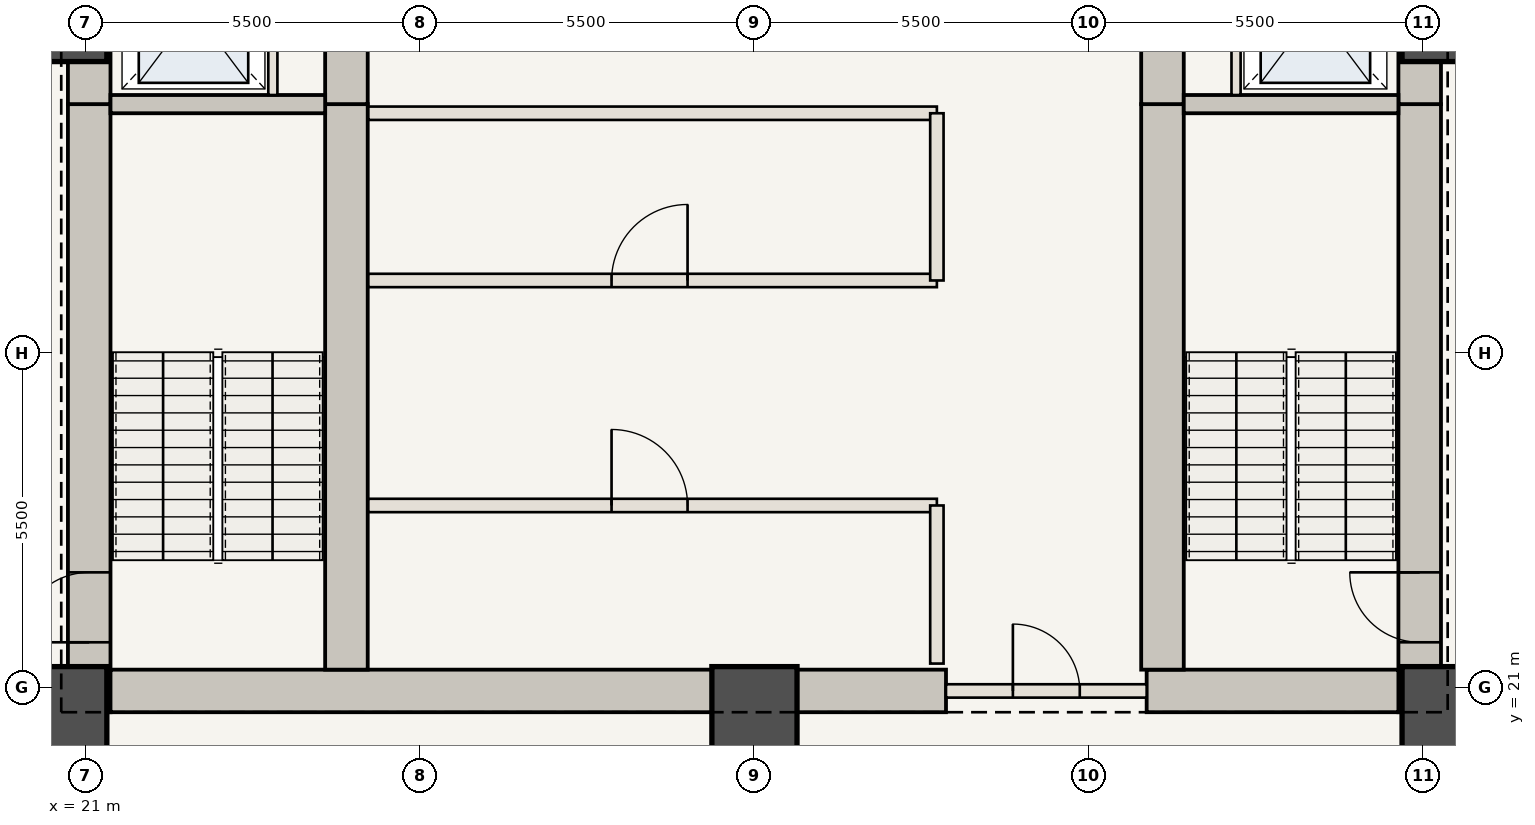
"""IFC4 building model, lengths in metres.
Left out: names, types, materials, properties, quantities, classifications, styles, units other than length and angle.
Written with IfcOpenShell. Run it as: python <this file> out.ifc"""

import sys

from ifc_helpers import new_model, si_unit, direction, frame, frame_2d, origin, origin_2d, place, context, subcontext, project, spatial, rectangle, extrude, element, fill, save


model = new_model("IFC4")
c1 = context("Model", 3, precision=1e-05, world=origin(), true_north=direction((0.0, 1.0)))
c2 = subcontext(c1, "Body", "Model", "MODEL_VIEW")
j1 = project(units=[si_unit("LENGTHUNIT", "METRE"), si_unit("PLANEANGLEUNIT", "RADIAN")], contexts=[c1])
p1 = place(None, origin())
s1 = spatial("IfcSite", under=j1, at=p1, CompositionType="ELEMENT")
p2 = place(p1, origin())
s2 = spatial("IfcBuilding", under=s1, at=p2, CompositionType="ELEMENT")
p3 = place(p2, frame((0.0, 0.0, -4.55)))
s3 = spatial("IfcBuildingStorey", under=s2, at=p3, CompositionType="ELEMENT", Elevation=-4.55)
p4 = place(p3, frame((21.06, 20.6, 0.0), z_axis=(0.0, 0.0, 1.0), x_axis=(0.0, 1.0, 0.0)))
e1 = element("IfcWall", 1, at=p4, inside=s3, PredefinedType="SHEAR", context=c2, shape_type="SweptSolid", body=[
    extrude(rectangle(XDim=10.0, YDim=0.7, at=frame_2d((5.0, 0.0))), origin(), (0.0, 0.0, 1.0), 4.55),
])
p5 = place(p4, frame((1.15, 0.0, 0.0)))
e2 = element("IfcOpeningElement", 2, at=p5, cuts=e1, PredefinedType="OPENING", context=c2, shape_type="SweptSolid", body=[
    extrude(rectangle(XDim=1.15, YDim=2.15, at=frame_2d((0.575, 1.075))), frame((0.0, 0.36, 0.0), z_axis=(0.0, -1.0, 0.0), x_axis=(1.0, 0.0, 0.0)), (0.0, 0.0, 1.0), 0.72),
])
p6 = place(p3, frame((21.06, 30.6, 0.0), z_axis=(0.0, 0.0, 1.0), x_axis=(0.0, 1.0, 0.0)))
e3 = element("IfcWall", 3, at=p6, inside=s3, PredefinedType="SHEAR", context=c2, shape_type="SweptSolid", body=[
    extrude(rectangle(XDim=12.75, YDim=0.7, at=frame_2d((6.375, 0.0))), origin(), (0.0, 0.0, 1.0), 4.55),
])
p7 = place(p6, frame((4.2, 0.0, 0.0)))
e4 = element("IfcOpeningElement", 4, at=p7, cuts=e3, PredefinedType="OPENING", context=c2, shape_type="SweptSolid", body=[
    extrude(rectangle(XDim=1.1, YDim=2.15, at=frame_2d((0.55, 1.075))), frame((0.0, 0.36, 0.0), z_axis=(0.0, -1.0, 0.0), x_axis=(1.0, 0.0, 0.0)), (0.0, 0.0, 1.0), 0.72),
])
p8 = place(p6, frame((9.2, 0.0, 0.0)))
e5 = element("IfcOpeningElement", 5, at=p8, cuts=e3, PredefinedType="OPENING", context=c2, shape_type="SweptSolid", body=[
    extrude(rectangle(XDim=0.92, YDim=2.1, at=frame_2d((0.46, 1.05))), frame((0.0, 0.36, 0.0), z_axis=(0.0, -1.0, 0.0), x_axis=(1.0, 0.0, 0.0)), (0.0, 0.0, 1.0), 0.72),
])
p9 = place(p3, frame((42.94, 20.6, 0.0), z_axis=(0.0, 0.0, 1.0), x_axis=(0.0, 1.0, 0.0)))
e6 = element("IfcWall", 6, at=p9, inside=s3, PredefinedType="SHEAR", context=c2, shape_type="SweptSolid", body=[
    extrude(rectangle(XDim=10.0, YDim=0.7, at=frame_2d((5.0, 0.0))), origin(), (0.0, 0.0, 1.0), 4.55),
])
p10 = place(p9, frame((1.15, 0.0, 0.0)))
e7 = element("IfcOpeningElement", 7, at=p10, cuts=e6, PredefinedType="OPENING", context=c2, shape_type="SweptSolid", body=[
    extrude(rectangle(XDim=1.15, YDim=2.15, at=frame_2d((0.575, 1.075))), frame((0.0, 0.36, 0.0), z_axis=(0.0, -1.0, 0.0), x_axis=(1.0, 0.0, 0.0)), (0.0, 0.0, 1.0), 0.72),
])
p11 = place(p3, frame((42.94, 30.6, 0.0), z_axis=(0.0, 0.0, 1.0), x_axis=(0.0, 1.0, 0.0)))
e8 = element("IfcWall", 8, at=p11, inside=s3, PredefinedType="SHEAR", context=c2, shape_type="SweptSolid", body=[
    extrude(rectangle(XDim=12.75, YDim=0.7, at=frame_2d((6.375, 0.0))), origin(), (0.0, 0.0, 1.0), 4.55),
])
p12 = place(p11, frame((4.2, 0.0, 0.0)))
e9 = element("IfcOpeningElement", 9, at=p12, cuts=e8, PredefinedType="OPENING", context=c2, shape_type="SweptSolid", body=[
    extrude(rectangle(XDim=1.1, YDim=2.15, at=frame_2d((0.55, 1.075))), frame((0.0, 0.36, 0.0), z_axis=(0.0, -1.0, 0.0), x_axis=(1.0, 0.0, 0.0)), (0.0, 0.0, 1.0), 0.72),
])
p13 = place(p11, frame((8.4, 0.0, 0.0)))
e10 = element("IfcOpeningElement", 10, at=p13, cuts=e8, PredefinedType="OPENING", context=c2, shape_type="SweptSolid", body=[
    extrude(rectangle(XDim=0.88, YDim=2.1, at=frame_2d((0.44, 1.05))), frame((0.0, 0.36, 0.0), z_axis=(0.0, -1.0, 0.0), x_axis=(1.0, 0.0, 0.0)), (0.0, 0.0, 1.0), 0.72),
])
p14 = place(p11, frame((10.5, 0.0, 0.0)))
e11 = element("IfcOpeningElement", 11, at=p14, cuts=e8, PredefinedType="OPENING", context=c2, shape_type="SweptSolid", body=[
    extrude(rectangle(XDim=0.88, YDim=2.1, at=frame_2d((0.44, 1.05))), frame((0.0, 0.36, 0.0), z_axis=(0.0, -1.0, 0.0), x_axis=(1.0, 0.0, 0.0)), (0.0, 0.0, 1.0), 0.72),
])
p15 = place(p3, frame((21.41, 20.95, 0.0), z_axis=(0.0, 0.0, 1.0), x_axis=(1.0, 0.0, 0.0)))
e12 = element("IfcWall", 12, at=p15, inside=s3, PredefinedType="SHEAR", context=c2, shape_type="SweptSolid", body=[
    extrude(rectangle(XDim=13.74, YDim=0.7, at=frame_2d((6.87, 0.0))), origin(), (0.0, 0.0, 1.0), 4.55),
])
p16 = place(p3, frame((38.45, 20.95, 0.0), z_axis=(0.0, 0.0, 1.0), x_axis=(1.0, 0.0, 0.0)))
e13 = element("IfcWall", 13, at=p16, inside=s3, PredefinedType="SHEAR", context=c2, shape_type="SweptSolid", body=[
    extrude(rectangle(XDim=4.14, YDim=0.7, at=frame_2d((2.07, 0.0))), origin(), (0.0, 0.0, 1.0), 4.55),
])
p17 = place(p3, frame((25.29, 21.3, 0.0), z_axis=(0.0, 0.0, 1.0), x_axis=(0.0, 1.0, 0.0)))
e14 = element("IfcWall", 14, at=p17, inside=s3, PredefinedType="SHEAR", context=c2, shape_type="SweptSolid", body=[
    extrude(rectangle(XDim=9.3, YDim=0.7, at=frame_2d((4.65, 0.0))), origin(), (0.0, 0.0, 1.0), 4.55),
])
p18 = place(p3, frame((25.29, 30.6, 0.0), z_axis=(0.0, 0.0, 1.0), x_axis=(0.0, 1.0, 0.0)))
e15 = element("IfcWall", 15, at=p18, inside=s3, PredefinedType="SHEAR", context=c2, shape_type="SweptSolid", body=[
    extrude(rectangle(XDim=12.05, YDim=0.7, at=frame_2d((6.025, 0.0))), origin(), (0.0, 0.0, 1.0), 4.55),
])
p19 = place(p18, frame((6.25, 0.0, 0.0)))
e16 = element("IfcOpeningElement", 16, at=p19, cuts=e15, PredefinedType="OPENING", context=c2, shape_type="SweptSolid", body=[
    extrude(rectangle(XDim=1.1, YDim=2.15, at=frame_2d((0.55, 1.075))), frame((0.0, 0.36, 0.0), z_axis=(0.0, -1.0, 0.0), x_axis=(1.0, 0.0, 0.0)), (0.0, 0.0, 1.0), 0.72),
])
p20 = place(p3, frame((38.71, 21.3, 0.0), z_axis=(0.0, 0.0, 1.0), x_axis=(0.0, 1.0, 0.0)))
e17 = element("IfcWall", 17, at=p20, inside=s3, PredefinedType="SHEAR", context=c2, shape_type="SweptSolid", body=[
    extrude(rectangle(XDim=9.3, YDim=0.7, at=frame_2d((4.65, 0.0))), origin(), (0.0, 0.0, 1.0), 4.55),
])
p21 = place(p3, frame((38.71, 30.6, 0.0), z_axis=(0.0, 0.0, 1.0), x_axis=(0.0, 1.0, 0.0)))
e18 = element("IfcWall", 18, at=p21, inside=s3, PredefinedType="SHEAR", context=c2, shape_type="SweptSolid", body=[
    extrude(rectangle(XDim=12.05, YDim=0.7, at=frame_2d((6.025, 0.0))), origin(), (0.0, 0.0, 1.0), 4.55),
])
for number, where, z_axis, x_axis in (
    (19, (20.65, 20.65, 0.0), (0.0, 0.0, 1.0), (1.0, 0.0, 0.0)),
    (20, (32.0, 20.65, 0.0), (0.0, 0.0, 1.0), (1.0, 0.0, 0.0)),
    (21, (43.35, 20.65, 0.0), (0.0, 0.0, 1.0), (1.0, 0.0, 0.0)),
    (22, (43.35, 32.0, 0.0), (0.0, 0.0, 1.0), (1.0, 0.0, 0.0)),
    (23, (20.65, 32.0, 0.0), (0.0, 0.0, 1.0), (1.0, 0.0, 0.0)),
):
    element("IfcColumn", number, at=place(p3, frame(where, z_axis=z_axis, x_axis=x_axis)), inside=s3, PredefinedType="COLUMN", context=c2, shape_type="SweptSolid", body=[
        extrude(rectangle(XDim=1.4, YDim=1.4, at=origin_2d()), origin(), (0.0, 0.0, 1.0), 4.55),
    ])
for number, where, z_axis, x_axis in (
    (24, (21.41, 30.6, 0.0), (0.0, 0.0, 1.0), (1.0, 0.0, 0.0)),
    (25, (39.06, 30.6, 0.0), (0.0, 0.0, 1.0), (1.0, 0.0, 0.0)),
):
    element("IfcWall", number, at=place(p3, frame(where, z_axis=z_axis, x_axis=x_axis)), inside=s3, PredefinedType="SHEAR", context=c2, shape_type="SweptSolid", body=[
        extrude(rectangle(XDim=3.53, YDim=0.3, at=frame_2d((1.765, 0.0))), origin(), (0.0, 0.0, 1.0), 4.23),
    ])
for number, where, z_axis, x_axis in (
    (26, (24.08, 30.75, 0.0), (0.0, 0.0, 1.0), (0.0, 1.0, 0.0)),
    (27, (39.92, 30.75, 0.0), (0.0, 0.0, 1.0), (0.0, 1.0, 0.0)),
):
    element("IfcWall", number, at=place(p3, frame(where, z_axis=z_axis, x_axis=x_axis)), inside=s3, PredefinedType="STANDARD", context=c2, shape_type="SweptSolid", body=[
        extrude(rectangle(XDim=2.65, YDim=0.15, at=frame_2d((1.325, 0.0))), origin(), (0.0, 0.0, 1.0), 4.23),
    ])
p22 = place(p3, frame((35.15, 20.95, 0.0), z_axis=(0.0, 0.0, 1.0), x_axis=(1.0, 0.0, 0.0)))
e28 = element("IfcWall", 28, at=p22, inside=s3, PredefinedType="STANDARD", context=c2, shape_type="SweptSolid", body=[
    extrude(rectangle(XDim=3.3, YDim=0.22, at=frame_2d((1.65, 0.0))), origin(), (0.0, 0.0, 1.0), 4.23),
])
p23 = place(p22, frame((1.1, 0.0, 0.0)))
e29 = element("IfcOpeningElement", 29, at=p23, cuts=e28, PredefinedType="OPENING", context=c2, shape_type="SweptSolid", body=[
    extrude(rectangle(XDim=1.1, YDim=2.15, at=frame_2d((0.55, 1.075))), frame((0.0, 0.12, 0.0), z_axis=(0.0, -1.0, 0.0), x_axis=(1.0, 0.0, 0.0)), (0.0, 0.0, 1.0), 0.24),
])
p24 = place(p3, frame((25.65, 24.0, 0.0), z_axis=(0.0, 0.0, 1.0), x_axis=(1.0, 0.0, 0.0)))
e30 = element("IfcWall", 30, at=p24, inside=s3, PredefinedType="STANDARD", context=c2, shape_type="SweptSolid", body=[
    extrude(rectangle(XDim=9.35, YDim=0.22, at=frame_2d((4.675, 0.0))), origin(), (0.0, 0.0, 1.0), 4.23),
])
p25 = place(p24, frame((4.0, 0.0, 0.0)))
e31 = element("IfcOpeningElement", 31, at=p25, cuts=e30, PredefinedType="OPENING", context=c2, shape_type="SweptSolid", body=[
    extrude(rectangle(XDim=1.25, YDim=2.2, at=frame_2d((0.625, 1.1))), frame((0.0, 0.12, 0.0), z_axis=(0.0, -1.0, 0.0), x_axis=(1.0, 0.0, 0.0)), (0.0, 0.0, 1.0), 0.24),
])
p26 = place(p3, frame((35.0, 21.4, 0.0), z_axis=(0.0, 0.0, 1.0), x_axis=(0.0, 1.0, 0.0)))
e32 = element("IfcWall", 32, at=p26, inside=s3, PredefinedType="STANDARD", context=c2, shape_type="SweptSolid", body=[
    extrude(rectangle(XDim=2.6, YDim=0.22, at=frame_2d((1.3, 0.0))), origin(), (0.0, 0.0, 1.0), 4.23),
])
p27 = place(p3, frame((25.65, 27.7, 0.0), z_axis=(0.0, 0.0, 1.0), x_axis=(1.0, 0.0, 0.0)))
e33 = element("IfcWall", 33, at=p27, inside=s3, PredefinedType="STANDARD", context=c2, shape_type="SweptSolid", body=[
    extrude(rectangle(XDim=9.35, YDim=0.22, at=frame_2d((4.675, 0.0))), origin(), (0.0, 0.0, 1.0), 4.23),
])
p28 = place(p27, frame((4.0, 0.0, 0.0)))
e34 = element("IfcOpeningElement", 34, at=p28, cuts=e33, PredefinedType="OPENING", context=c2, shape_type="SweptSolid", body=[
    extrude(rectangle(XDim=1.25, YDim=2.2, at=frame_2d((0.625, 1.1))), frame((0.0, 0.12, 0.0), z_axis=(0.0, -1.0, 0.0), x_axis=(1.0, 0.0, 0.0)), (0.0, 0.0, 1.0), 0.24),
])
p29 = place(p3, frame((25.65, 30.45, 0.0), z_axis=(0.0, 0.0, 1.0), x_axis=(1.0, 0.0, 0.0)))
e35 = element("IfcWall", 35, at=p29, inside=s3, PredefinedType="STANDARD", context=c2, shape_type="SweptSolid", body=[
    extrude(rectangle(XDim=9.35, YDim=0.22, at=frame_2d((4.675, 0.0))), origin(), (0.0, 0.0, 1.0), 4.23),
])
p30 = place(p3, frame((35.0, 27.7, 0.0), z_axis=(0.0, 0.0, 1.0), x_axis=(0.0, 1.0, 0.0)))
e36 = element("IfcWall", 36, at=p30, inside=s3, PredefinedType="STANDARD", context=c2, shape_type="SweptSolid", body=[
    extrude(rectangle(XDim=2.75, YDim=0.22, at=frame_2d((1.375, 0.0))), origin(), (0.0, 0.0, 1.0), 4.23),
])
p31 = place(p5, origin())
e37 = element("IfcDoor", 37, at=p31, inside=s3, OperationType="SINGLE_SWING_LEFT", PredefinedType="DOOR", context=c2, shape_type="SweptSolid", body=[
    extrude(rectangle(XDim=1.15, YDim=2.15, at=frame_2d((0.575, 1.075))), frame((0.0, 0.025, 0.0), z_axis=(0.0, -1.0, 0.0), x_axis=(1.0, 0.0, 0.0)), (0.0, 0.0, 1.0), 0.05),
])
fill(e2, e37)
p32 = place(p10, origin())
e38 = element("IfcDoor", 38, at=p32, inside=s3, OperationType="SINGLE_SWING_RIGHT", PredefinedType="DOOR", context=c2, shape_type="SweptSolid", body=[
    extrude(rectangle(XDim=1.15, YDim=2.15, at=frame_2d((0.575, 1.075))), frame((0.0, 0.025, 0.0), z_axis=(0.0, -1.0, 0.0), x_axis=(1.0, 0.0, 0.0)), (0.0, 0.0, 1.0), 0.05),
])
fill(e7, e38)
p33 = place(p23, origin())
e39 = element("IfcDoor", 39, at=p33, inside=s3, OperationType="SINGLE_SWING_LEFT", PredefinedType="DOOR", context=c2, shape_type="SweptSolid", body=[
    extrude(rectangle(XDim=1.1, YDim=2.15, at=frame_2d((0.55, 1.075))), frame((0.0, 0.025, 0.0), z_axis=(0.0, -1.0, 0.0), x_axis=(1.0, 0.0, 0.0)), (0.0, 0.0, 1.0), 0.05),
])
fill(e29, e39)
p34 = place(p25, origin())
e40 = element("IfcDoor", 40, at=p34, inside=s3, OperationType="SINGLE_SWING_LEFT", PredefinedType="DOOR", context=c2, shape_type="SweptSolid", body=[
    extrude(rectangle(XDim=1.25, YDim=2.2, at=frame_2d((0.625, 1.1))), frame((0.0, 0.025, 0.0), z_axis=(0.0, -1.0, 0.0), x_axis=(1.0, 0.0, 0.0)), (0.0, 0.0, 1.0), 0.05),
])
fill(e31, e40)
p35 = place(p28, origin())
e41 = element("IfcDoor", 41, at=p35, inside=s3, OperationType="SINGLE_SWING_RIGHT", PredefinedType="DOOR", context=c2, shape_type="SweptSolid", body=[
    extrude(rectangle(XDim=1.25, YDim=2.2, at=frame_2d((0.625, 1.1))), frame((0.0, 0.025, 0.0), z_axis=(0.0, -1.0, 0.0), x_axis=(1.0, 0.0, 0.0)), (0.0, 0.0, 1.0), 0.05),
])
fill(e34, e41)
save(model, sys.argv[1])
